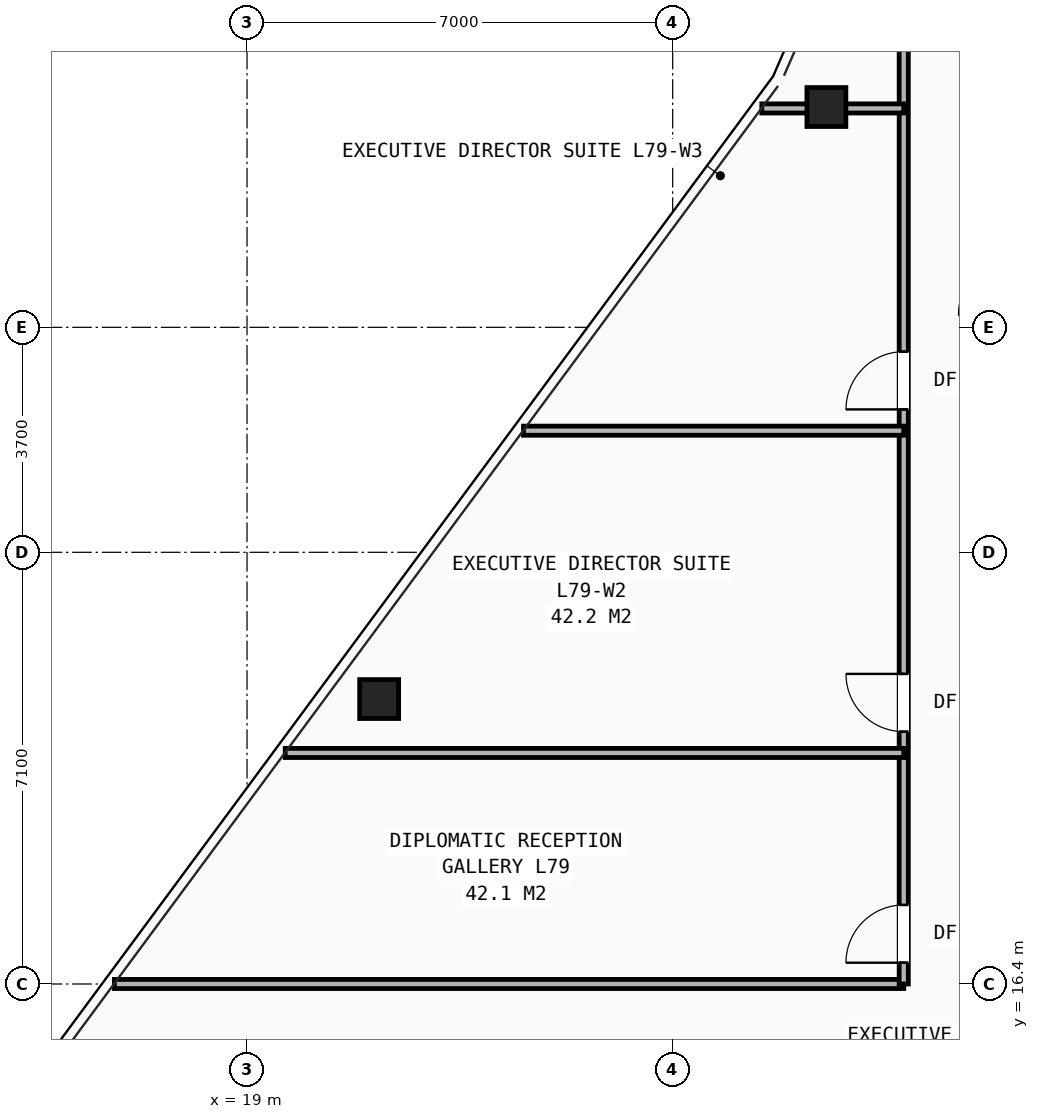
"""IFC4 building model, lengths in metres.
Left out: names, types, materials, properties, quantities, classifications, styles, units other than length and angle.
Written with IfcOpenShell. Run it as: python <this file> out.ifc"""

import sys

from ifc_helpers import new_model, si_unit, direction, frame, frame_2d, origin, origin_2d, place, context, subcontext, project, spatial, rectangle, hollow_rectangle, extrude, element, fill, save


model = new_model("IFC4")
c1 = context("Model", 3, precision=1e-05, world=origin(), true_north=direction((0.0, 1.0)))
c2 = subcontext(c1, "Body", "Model", "MODEL_VIEW")
j1 = project(units=[si_unit("LENGTHUNIT", "METRE"), si_unit("PLANEANGLEUNIT", "RADIAN")], contexts=[c1])
p1 = place(None, origin())
s1 = spatial("IfcSite", under=j1, at=p1, CompositionType="ELEMENT")
p2 = place(p1, origin())
s2 = spatial("IfcBuilding", under=s1, at=p2, CompositionType="ELEMENT")
p3 = place(p2, frame((0.0, 0.0, 279.5)))
s3 = spatial("IfcBuildingStorey", under=s2, at=p3, CompositionType="ELEMENT", Elevation=279.5)
for number, where, z_axis, x_axis in (
    (1, (28.528, 30.823, 0.0), (0.0, 0.0, 1.0), (1.0, 0.0, 0.0)),
    (2, (21.173, 21.086, 0.0), (0.0, 0.0, 1.0), (1.0, 0.0, 0.0)),
):
    element("IfcColumn", number, at=place(p3, frame(where, z_axis=z_axis, x_axis=x_axis)), inside=s3, PredefinedType="COLUMN", context=c2, shape_type="SweptSolid", body=[
        extrude(hollow_rectangle(XDim=0.64, YDim=0.64, WallThickness=0.045, at=origin_2d()), origin(), (0.0, 0.0, 1.0), 3.5),
    ])
p4 = place(p3, frame((16.818, 16.4, 0.0), z_axis=(0.0, 0.0, 1.0), x_axis=(1.0, 0.0, 0.0)))
e3 = element("IfcWall", 3, at=p4, inside=s3, PredefinedType="PARTITIONING", context=c2, shape_type="SweptSolid", body=[
    extrude(rectangle(XDim=12.982, YDim=0.15, at=frame_2d((6.491, 0.0))), origin(), (0.0, 0.0, 1.0), 2.292),
])
p5 = place(p3, frame((29.8, 16.4, 0.0), z_axis=(0.0, 0.0, 1.0), x_axis=(0.0, 1.0, 0.0)))
e4 = element("IfcWall", 4, at=p5, inside=s3, PredefinedType="PARTITIONING", context=c2, shape_type="SweptSolid", body=[
    extrude(rectangle(XDim=19.3, YDim=0.15, at=frame_2d((9.65, 0.0))), origin(), (0.0, 0.0, 1.0), 2.292),
])
p6 = place(p5, frame((0.35, 0.0, 0.0)))
e5 = element("IfcOpeningElement", 5, at=p6, cuts=e4, PredefinedType="OPENING", context=c2, shape_type="SweptSolid", body=[
    extrude(rectangle(XDim=0.95, YDim=2.1, at=frame_2d((0.475, 1.05))), frame((0.0, 0.085, 0.0), z_axis=(0.0, -1.0, 0.0), x_axis=(1.0, 0.0, 0.0)), (0.0, 0.0, 1.0), 0.17),
])
p7 = place(p5, frame((4.15, 0.0, 0.0)))
e6 = element("IfcOpeningElement", 6, at=p7, cuts=e4, PredefinedType="OPENING", context=c2, shape_type="SweptSolid", body=[
    extrude(rectangle(XDim=0.95, YDim=2.1, at=frame_2d((0.475, 1.05))), frame((0.0, 0.085, 0.0), z_axis=(0.0, -1.0, 0.0), x_axis=(1.0, 0.0, 0.0)), (0.0, 0.0, 1.0), 0.17),
])
p8 = place(p5, frame((9.45, 0.0, 0.0)))
e7 = element("IfcOpeningElement", 7, at=p8, cuts=e4, PredefinedType="OPENING", context=c2, shape_type="SweptSolid", body=[
    extrude(rectangle(XDim=0.95, YDim=2.1, at=frame_2d((0.475, 1.05))), frame((0.0, 0.085, 0.0), z_axis=(0.0, -1.0, 0.0), x_axis=(1.0, 0.0, 0.0)), (0.0, 0.0, 1.0), 0.17),
])
p9 = place(p3, frame((19.628, 20.2, 0.0), z_axis=(0.0, 0.0, 1.0), x_axis=(1.0, 0.0, 0.0)))
e8 = element("IfcWall", 8, at=p9, inside=s3, PredefinedType="PARTITIONING", context=c2, shape_type="SweptSolid", body=[
    extrude(rectangle(XDim=10.172, YDim=0.15, at=frame_2d((5.086, 0.0))), origin(), (0.0, 0.0, 1.0), 2.292),
])
p10 = place(p3, frame((23.547, 25.5, 0.0), z_axis=(0.0, 0.0, 1.0), x_axis=(1.0, 0.0, 0.0)))
e9 = element("IfcWall", 9, at=p10, inside=s3, PredefinedType="PARTITIONING", context=c2, shape_type="SweptSolid", body=[
    extrude(rectangle(XDim=6.253, YDim=0.15, at=frame_2d((3.127, 0.0))), origin(), (0.0, 0.0, 1.0), 2.628),
])
p11 = place(p3, frame((27.466, 30.8, 0.0), z_axis=(0.0, 0.0, 1.0), x_axis=(1.0, 0.0, 0.0)))
e10 = element("IfcWall", 10, at=p11, inside=s3, PredefinedType="PARTITIONING", context=c2, shape_type="SweptSolid", body=[
    extrude(rectangle(XDim=2.334, YDim=0.15, at=frame_2d((1.167, 0.0))), origin(), (0.0, 0.0, 1.0), 2.292),
])
p12 = place(p6, origin())
e11 = element("IfcDoor", 11, at=p12, inside=s3, OperationType="SINGLE_SWING_LEFT", PredefinedType="DOOR", context=c2, shape_type="SweptSolid", body=[
    extrude(rectangle(XDim=0.95, YDim=2.1, at=frame_2d((0.475, 1.05))), frame((0.0, 0.025, 0.0), z_axis=(0.0, -1.0, 0.0), x_axis=(1.0, 0.0, 0.0)), (0.0, 0.0, 1.0), 0.05),
])
fill(e5, e11)
p13 = place(p7, origin())
e12 = element("IfcDoor", 12, at=p13, inside=s3, OperationType="SINGLE_SWING_RIGHT", PredefinedType="DOOR", context=c2, shape_type="SweptSolid", body=[
    extrude(rectangle(XDim=0.95, YDim=2.1, at=frame_2d((0.475, 1.05))), frame((0.0, 0.025, 0.0), z_axis=(0.0, -1.0, 0.0), x_axis=(1.0, 0.0, 0.0)), (0.0, 0.0, 1.0), 0.05),
])
fill(e6, e12)
p14 = place(p8, origin())
e13 = element("IfcDoor", 13, at=p14, inside=s3, OperationType="SINGLE_SWING_LEFT", PredefinedType="DOOR", context=c2, shape_type="SweptSolid", body=[
    extrude(rectangle(XDim=0.95, YDim=2.1, at=frame_2d((0.475, 1.05))), frame((0.0, 0.025, 0.0), z_axis=(0.0, -1.0, 0.0), x_axis=(1.0, 0.0, 0.0)), (0.0, 0.0, 1.0), 0.05),
])
fill(e7, e13)
save(model, sys.argv[1])
